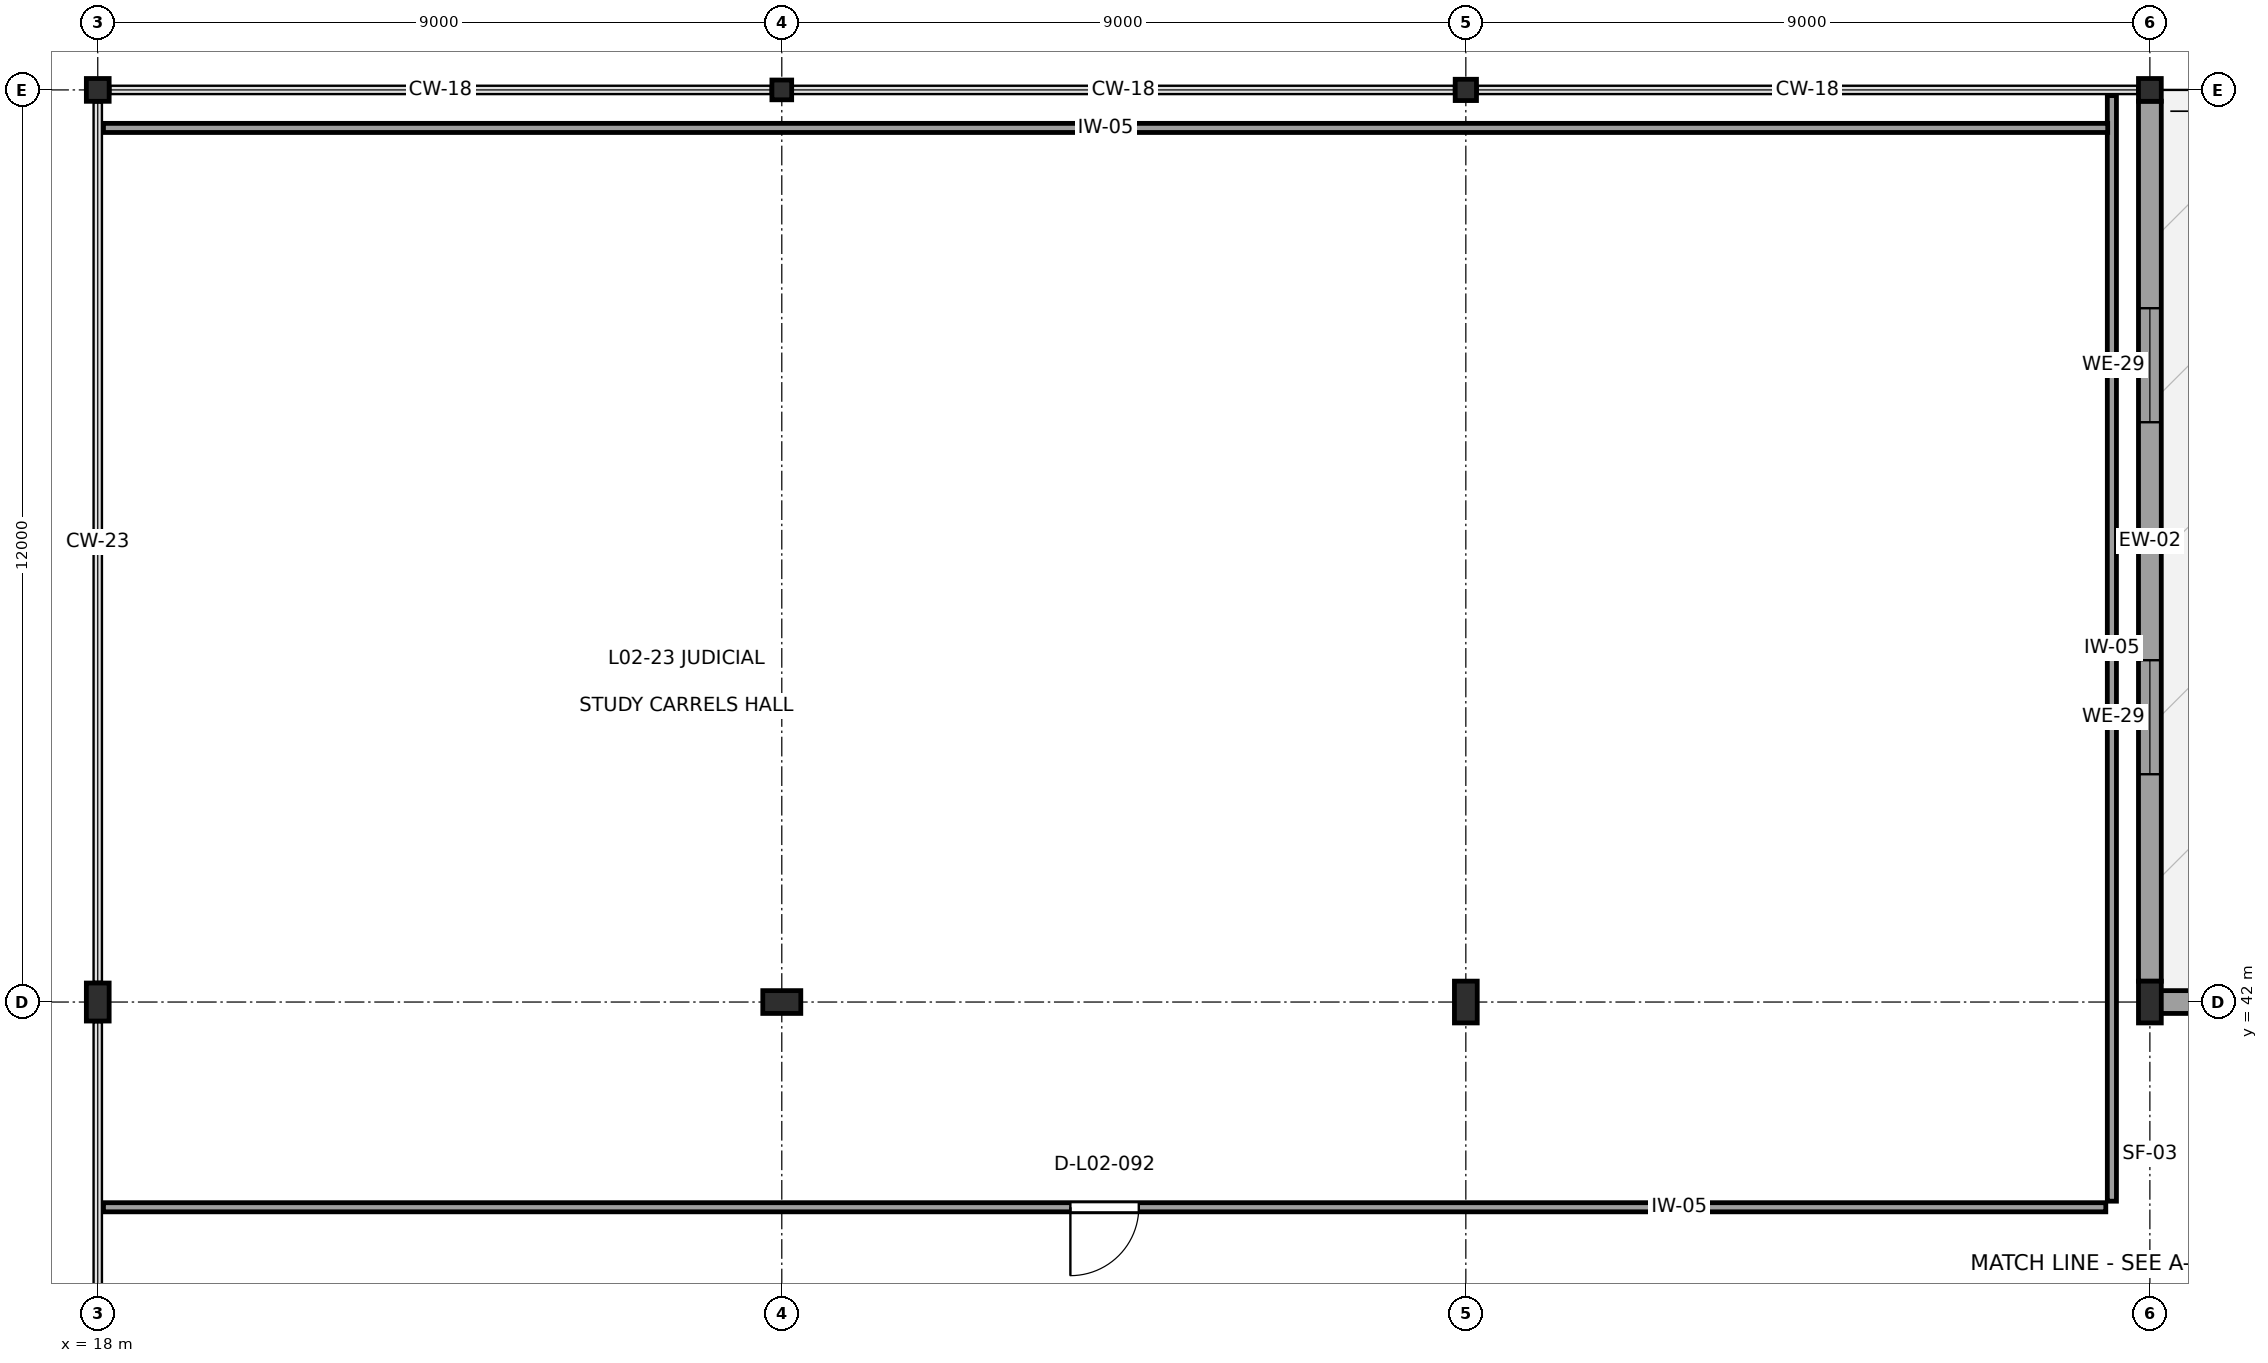
"""IFC4 building model, lengths in metres.
Left out: names, types, materials, properties, quantities, classifications, styles, units other than length and angle.
Written with IfcOpenShell. Run it as: python <this file> out.ifc"""

import sys

from ifc_helpers import new_model, si_unit, direction, frame, frame_2d, origin, origin_2d, place, context, subcontext, project, spatial, rectangle, i_section, extrude, element, fill, save


model = new_model("IFC4")
c1 = context("Model", 3, precision=1e-05, world=origin(), true_north=direction((0.0, 1.0)))
c2 = subcontext(c1, "Body", "Model", "MODEL_VIEW")
j1 = project(units=[si_unit("LENGTHUNIT", "METRE"), si_unit("PLANEANGLEUNIT", "RADIAN")], contexts=[c1])
p1 = place(None, origin())
s1 = spatial("IfcSite", under=j1, at=p1, CompositionType="ELEMENT")
p2 = place(p1, origin())
s2 = spatial("IfcBuilding", under=s1, at=p2, CompositionType="ELEMENT")
p3 = place(p2, frame((0.0, 0.0, 9.9)))
s3 = spatial("IfcBuildingStorey", under=s2, at=p3, CompositionType="ELEMENT", Elevation=9.9)
p4 = place(p3, frame((18.0, 42.0, 0.0), z_axis=(0.0, 0.0, 1.0), x_axis=(1.0, 0.0, 0.0)))
e1 = element("IfcColumn", 1, at=p4, inside=s3, PredefinedType="COLUMN", context=c2, shape_type="SweptSolid", body=[
    extrude(i_section(OverallWidth=0.3, OverallDepth=0.5, WebThickness=0.014, FlangeThickness=0.028, at=origin_2d()), origin(), (0.0, 0.0, 1.0), 4.5),
])
p5 = place(p3, frame((18.0, 54.0, 0.0), z_axis=(0.0, 0.0, 1.0), x_axis=(1.0, 0.0, 0.0)))
e2 = element("IfcColumn", 2, at=p5, inside=s3, PredefinedType="COLUMN", context=c2, shape_type="SweptSolid", body=[
    extrude(i_section(OverallWidth=0.3, OverallDepth=0.3, WebThickness=0.011, FlangeThickness=0.019, at=origin_2d()), origin(), (0.0, 0.0, 1.0), 4.5),
])
p6 = place(p3, frame((27.0, 42.0, 0.0), z_axis=(0.0, 0.0, 1.0), x_axis=(0.0, 1.0, 0.0)))
e3 = element("IfcColumn", 3, at=p6, inside=s3, PredefinedType="COLUMN", context=c2, shape_type="SweptSolid", body=[
    extrude(i_section(OverallWidth=0.3, OverallDepth=0.5, WebThickness=0.014, FlangeThickness=0.028, at=origin_2d()), origin(), (0.0, 0.0, 1.0), 4.5),
])
p7 = place(p3, frame((27.0, 54.0, 0.0), z_axis=(0.0, 0.0, 1.0), x_axis=(1.0, 0.0, 0.0)))
e4 = element("IfcColumn", 4, at=p7, inside=s3, PredefinedType="COLUMN", context=c2, shape_type="SweptSolid", body=[
    extrude(i_section(OverallWidth=0.26, OverallDepth=0.26, WebThickness=0.01, FlangeThickness=0.018, at=origin_2d()), origin(), (0.0, 0.0, 1.0), 4.5),
])
p8 = place(p3, frame((36.0, 42.0, 0.0), z_axis=(0.0, 0.0, 1.0), x_axis=(1.0, 0.0, 0.0)))
e5 = element("IfcColumn", 5, at=p8, inside=s3, PredefinedType="COLUMN", context=c2, shape_type="SweptSolid", body=[
    extrude(i_section(OverallWidth=0.3, OverallDepth=0.55, WebThickness=0.015, FlangeThickness=0.029, at=origin_2d()), origin(), (0.0, 0.0, 1.0), 4.5),
])
p9 = place(p3, frame((36.0, 54.0, 0.0), z_axis=(0.0, 0.0, 1.0), x_axis=(1.0, 0.0, 0.0)))
e6 = element("IfcColumn", 6, at=p9, inside=s3, PredefinedType="COLUMN", context=c2, shape_type="SweptSolid", body=[
    extrude(i_section(OverallWidth=0.28, OverallDepth=0.28, WebThickness=0.01, FlangeThickness=0.018, at=origin_2d()), origin(), (0.0, 0.0, 1.0), 4.5),
])
p10 = place(p3, frame((45.0, 42.0, 0.0), z_axis=(0.0, 0.0, 1.0), x_axis=(1.0, 0.0, 0.0)))
e7 = element("IfcColumn", 7, at=p10, inside=s3, PredefinedType="COLUMN", context=c2, shape_type="SweptSolid", body=[
    extrude(i_section(OverallWidth=0.3, OverallDepth=0.55, WebThickness=0.015, FlangeThickness=0.029, at=origin_2d()), origin(), (0.0, 0.0, 1.0), 4.5),
])
p11 = place(p3, frame((45.0, 54.0, 0.0), z_axis=(0.0, 0.0, 1.0), x_axis=(1.0, 0.0, 0.0)))
e8 = element("IfcColumn", 8, at=p11, inside=s3, PredefinedType="COLUMN", context=c2, shape_type="SweptSolid", body=[
    extrude(i_section(OverallWidth=0.3, OverallDepth=0.3, WebThickness=0.011, FlangeThickness=0.019, at=origin_2d()), origin(), (0.0, 0.0, 1.0), 4.5),
])
p12 = place(p3, frame((53.992, 42.0, 0.0), z_axis=(0.0, 0.0, 1.0), x_axis=(-1.0, 0.0, 0.0)))
e9 = element("IfcWall", 9, at=p12, inside=s3, PredefinedType="SOLIDWALL", context=c2, shape_type="SweptSolid", body=[
    extrude(rectangle(XDim=8.984, YDim=0.3, at=frame_2d((4.492, 0.0))), origin(), (0.0, 0.0, 1.0), 3.255),
])
p13 = place(p12, frame((3.792, 0.0, 0.0)))
e10 = element("IfcOpeningElement", 10, at=p13, cuts=e9, PredefinedType="OPENING", context=c2, shape_type="SweptSolid", body=[
    extrude(rectangle(XDim=1.4, YDim=2.3, at=frame_2d((0.7, 1.15))), frame((0.0, 0.165, 0.0), z_axis=(0.0, -1.0, 0.0), x_axis=(1.0, 0.0, 0.0)), (0.0, 0.0, 1.0), 0.33),
])
p14 = place(p3, frame((45.0, 42.273, 0.0), z_axis=(0.0, 0.0, 1.0), x_axis=(0.0, 1.0, 0.0)))
e11 = element("IfcWall", 11, at=p14, inside=s3, PredefinedType="SOLIDWALL", context=c2, shape_type="SweptSolid", body=[
    extrude(rectangle(XDim=11.579, YDim=0.3, at=frame_2d((5.79, 0.0))), origin(), (0.0, 0.0, 1.0), 3.715),
])
p15 = place(p14, frame((2.724, 0.0, 0.85)))
e12 = element("IfcOpeningElement", 12, at=p15, cuts=e11, PredefinedType="OPENING", context=c2, shape_type="SweptSolid", body=[
    extrude(rectangle(XDim=1.5, YDim=0.75, at=frame_2d((0.75, 0.375))), frame((0.0, 0.165, 0.0), z_axis=(0.0, -1.0, 0.0), x_axis=(1.0, 0.0, 0.0)), (0.0, 0.0, 1.0), 0.33),
])
p16 = place(p14, frame((7.355, 0.0, 0.85)))
e13 = element("IfcOpeningElement", 13, at=p16, cuts=e11, PredefinedType="OPENING", context=c2, shape_type="SweptSolid", body=[
    extrude(rectangle(XDim=1.5, YDim=0.75, at=frame_2d((0.75, 0.375))), frame((0.0, 0.165, 0.0), z_axis=(0.0, -1.0, 0.0), x_axis=(1.0, 0.0, 0.0)), (0.0, 0.0, 1.0), 0.33),
])
p17 = place(p3, frame((44.5, 53.925, 0.0), z_axis=(0.0, 0.0, 1.0), x_axis=(0.0, -1.0, 0.0)))
e14 = element("IfcWall", 14, at=p17, inside=s3, PredefinedType="PARTITIONING", context=c2, shape_type="SweptSolid", body=[
    extrude(rectangle(XDim=14.545, YDim=0.12, at=frame_2d((7.272, 0.0))), origin(), (0.0, 0.0, 1.0), 4.14),
])
p18 = place(p3, frame((44.42, 39.3, 0.0), z_axis=(0.0, 0.0, 1.0), x_axis=(-1.0, 0.0, 0.0)))
e15 = element("IfcWall", 15, at=p18, inside=s3, PredefinedType="PARTITIONING", context=c2, shape_type="SweptSolid", body=[
    extrude(rectangle(XDim=26.345, YDim=0.12, at=frame_2d((13.172, 0.0))), origin(), (0.0, 0.0, 1.0), 4.14),
])
p19 = place(p18, frame((12.723, 0.0, 0.0)))
e16 = element("IfcOpeningElement", 16, at=p19, cuts=e15, PredefinedType="OPENING", context=c2, shape_type="SweptSolid", body=[
    extrude(rectangle(XDim=0.9, YDim=2.1, at=frame_2d((0.45, 1.05))), frame((0.0, 0.075, 0.0), z_axis=(0.0, -1.0, 0.0), x_axis=(1.0, 0.0, 0.0)), (0.0, 0.0, 1.0), 0.15),
])
p20 = place(p3, frame((18.075, 53.5, 0.0), z_axis=(0.0, 0.0, 1.0), x_axis=(1.0, 0.0, 0.0)))
e17 = element("IfcWall", 17, at=p20, inside=s3, PredefinedType="PARTITIONING", context=c2, shape_type="SweptSolid", body=[
    extrude(rectangle(XDim=26.37, YDim=0.12, at=frame_2d((13.185, 0.0))), origin(), (0.0, 0.0, 1.0), 4.14),
])
p21 = place(p15, origin())
e18 = element("IfcWindow", 18, at=p21, inside=s3, PartitioningType="SINGLE_PANEL", PredefinedType="WINDOW", context=c2, shape_type="SweptSolid", body=[
    extrude(rectangle(XDim=1.5, YDim=0.75, at=frame_2d((0.75, 0.375))), frame((0.0, 0.03, 0.0), z_axis=(0.0, -1.0, 0.0), x_axis=(1.0, 0.0, 0.0)), (0.0, 0.0, 1.0), 0.06),
])
fill(e12, e18)
p22 = place(p16, origin())
e19 = element("IfcWindow", 19, at=p22, inside=s3, PartitioningType="SINGLE_PANEL", PredefinedType="WINDOW", context=c2, shape_type="SweptSolid", body=[
    extrude(rectangle(XDim=1.5, YDim=0.75, at=frame_2d((0.75, 0.375))), frame((0.0, 0.03, 0.0), z_axis=(0.0, -1.0, 0.0), x_axis=(1.0, 0.0, 0.0)), (0.0, 0.0, 1.0), 0.06),
])
fill(e13, e19)
p23 = place(p19, origin())
e20 = element("IfcDoor", 20, at=p23, inside=s3, OperationType="SINGLE_SWING_RIGHT", PredefinedType="DOOR", context=c2, shape_type="SweptSolid", body=[
    extrude(rectangle(XDim=0.9, YDim=2.1, at=frame_2d((0.45, 1.05))), frame((0.0, 0.025, 0.0), z_axis=(0.0, -1.0, 0.0), x_axis=(1.0, 0.0, 0.0)), (0.0, 0.0, 1.0), 0.05),
])
fill(e16, e20)
save(model, sys.argv[1])
